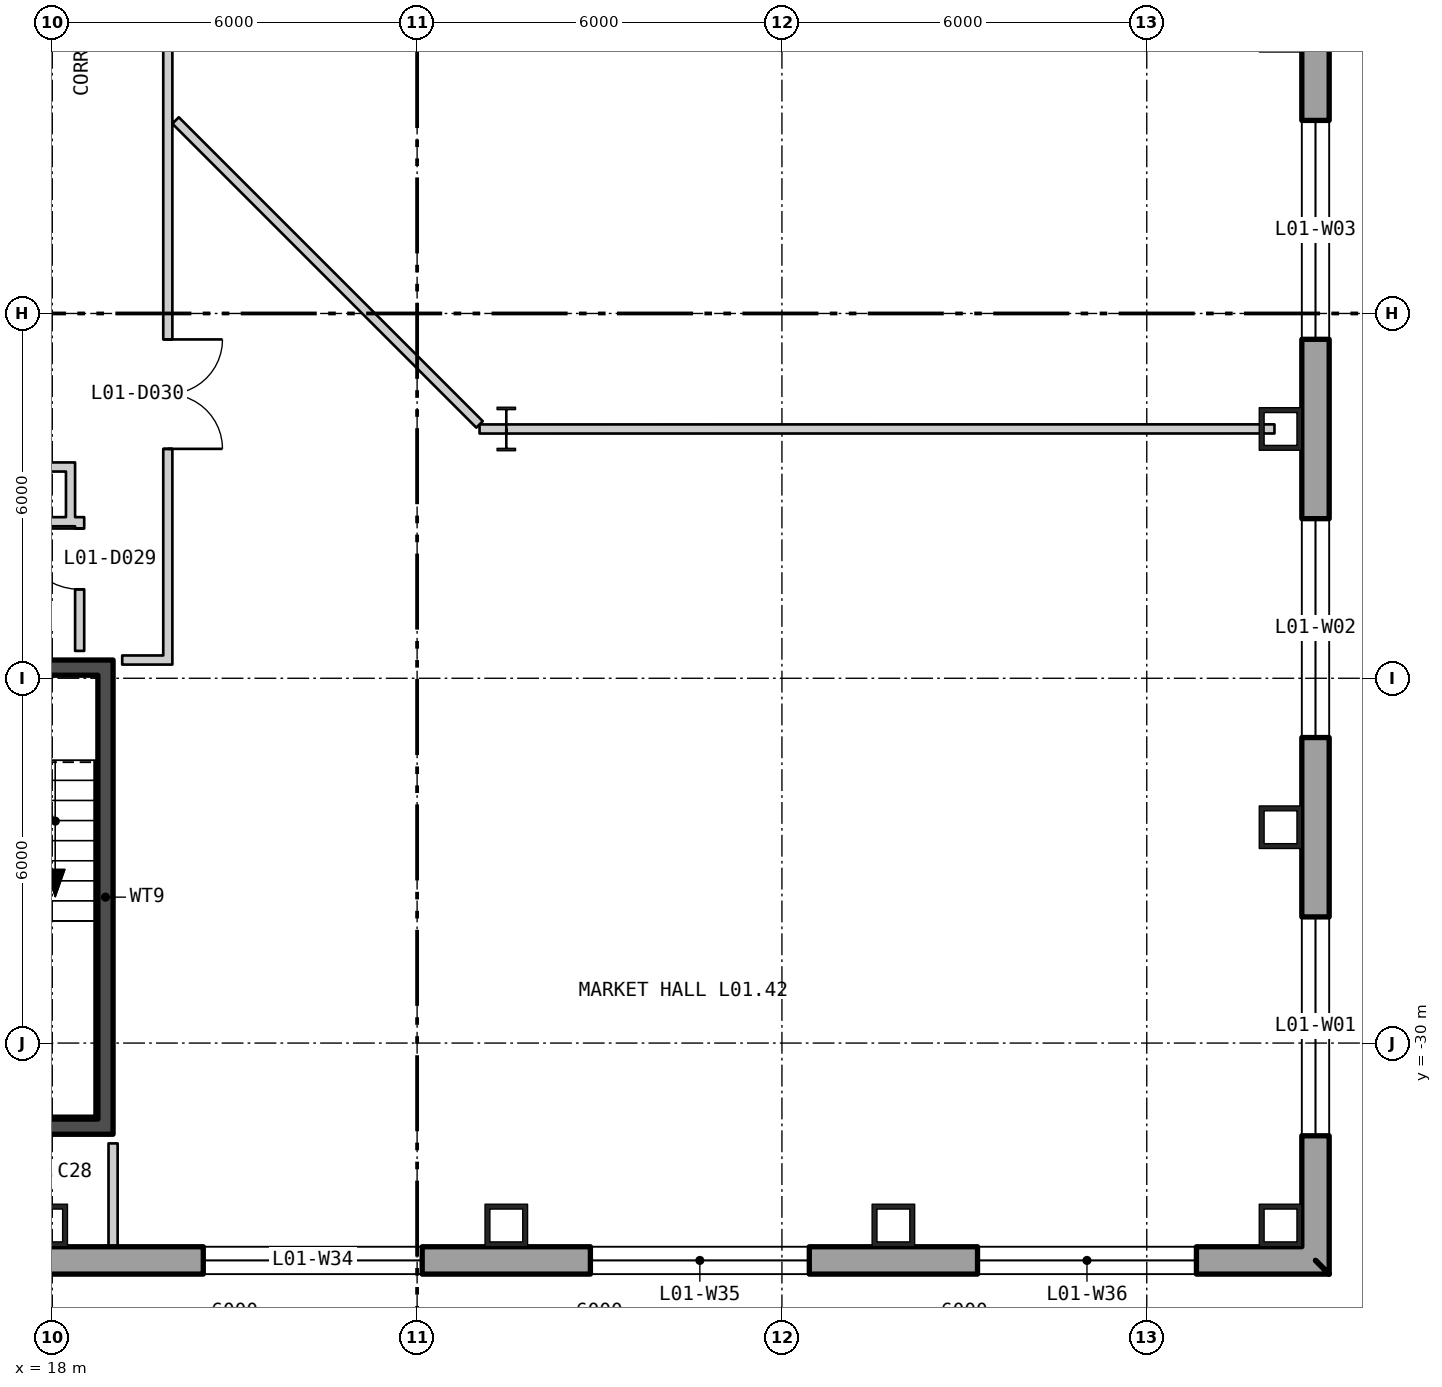
"""IFC4 building model, lengths in metres.
Left out: names, types, materials, properties, quantities, classifications, styles, units other than length and angle.
Written with IfcOpenShell. Run it as: python <this file> out.ifc"""

import sys

from ifc_helpers import new_model, si_unit, direction, frame, frame_2d, origin, origin_2d, place, context, subcontext, project, spatial, polyline, rectangle, hollow_rectangle, i_section, outline, extrude, element, fill, save


model = new_model("IFC4")
c1 = context("Model", 3, precision=1e-05, world=origin(), true_north=direction((0.0, 1.0)))
c2 = subcontext(c1, "Body", "Model", "MODEL_VIEW")
j1 = project(units=[si_unit("LENGTHUNIT", "METRE"), si_unit("PLANEANGLEUNIT", "RADIAN")], contexts=[c1])
p1 = place(None, origin())
s1 = spatial("IfcSite", under=j1, at=p1, CompositionType="ELEMENT")
p2 = place(p1, origin())
s2 = spatial("IfcBuilding", under=s1, at=p2, CompositionType="ELEMENT")
p3 = place(p2, frame((0.0, 0.0, 8.4)))
s3 = spatial("IfcBuildingStorey", under=s2, at=p3, CompositionType="ELEMENT", Elevation=8.4)
for number, where, z_axis, x_axis in (
    (1, (38.2, -33.0, 0.0), (0.0, 0.0, 1.0), (0.0, 1.0, 0.0)),
    (2, (38.2, -26.45, 0.0), (0.0, 0.0, 1.0), (0.0, 1.0, 0.0)),
    (3, (38.2, -19.9, 0.0), (0.0, 0.0, 1.0), (0.0, 1.0, 0.0)),
    (4, (17.9, -33.0, 0.0), (0.0, 0.0, 1.0), (1.0, 0.0, 0.0)),
    (5, (25.467, -33.0, 0.0), (0.0, 0.0, 1.0), (1.0, 0.0, 0.0)),
    (6, (31.833, -33.0, 0.0), (0.0, 0.0, 1.0), (1.0, 0.0, 0.0)),
):
    element("IfcColumn", number, at=place(p3, frame(where, z_axis=z_axis, x_axis=x_axis)), inside=s3, PredefinedType="COLUMN", context=c2, shape_type="SweptSolid", body=[
        extrude(hollow_rectangle(XDim=0.7, YDim=0.7, WallThickness=0.08, at=origin_2d()), origin(), (0.0, 0.0, 1.0), 5.1),
    ])
p4 = place(p3, frame((25.467, -19.9, 0.0), z_axis=(0.0, 0.0, 1.0), x_axis=(1.0, 0.0, 0.0)))
e7 = element("IfcColumn", 7, at=p4, inside=s3, PredefinedType="COLUMN", context=c2, shape_type="SweptSolid", body=[
    extrude(i_section(OverallWidth=0.304, OverallDepth=0.716, WebThickness=0.021, FlangeThickness=0.04, at=origin_2d()), origin(), (0.0, 0.0, 1.0), 5.1),
])
p5 = place(p3, frame((38.775, -33.575, -0.4), z_axis=(0.0, 0.0, 1.0), x_axis=(0.0, 1.0, 0.0)))
e8 = element("IfcWall", 8, at=p5, inside=s3, PredefinedType="SOLIDWALL", context=c2, shape_type="SweptSolid", body=[
    extrude(outline(polyline([(-0.225, -0.225), (53.775, -0.225), (53.325, 0.225), (0.225, 0.225), (-0.225, -0.225)])), origin(), (0.0, 0.0, 1.0), 5.1),
])
p6 = place(p5, frame((2.05, 0.0, 1.3)))
e9 = element("IfcOpeningElement", 9, at=p6, cuts=e8, PredefinedType="OPENING", context=c2, shape_type="SweptSolid", body=[
    extrude(rectangle(XDim=3.6, YDim=3.2, at=frame_2d((1.8, 1.6))), frame((0.0, 0.235, 0.0), z_axis=(0.0, -1.0, 0.0), x_axis=(1.0, 0.0, 0.0)), (0.0, 0.0, 1.0), 0.47),
])
p7 = place(p5, frame((8.6, 0.0, 1.3)))
e10 = element("IfcOpeningElement", 10, at=p7, cuts=e8, PredefinedType="OPENING", context=c2, shape_type="SweptSolid", body=[
    extrude(rectangle(XDim=3.6, YDim=3.2, at=frame_2d((1.8, 1.6))), frame((0.0, 0.235, 0.0), z_axis=(0.0, -1.0, 0.0), x_axis=(1.0, 0.0, 0.0)), (0.0, 0.0, 1.0), 0.47),
])
p8 = place(p5, frame((15.15, 0.0, 1.3)))
e11 = element("IfcOpeningElement", 11, at=p8, cuts=e8, PredefinedType="OPENING", context=c2, shape_type="SweptSolid", body=[
    extrude(rectangle(XDim=3.6, YDim=3.2, at=frame_2d((1.8, 1.6))), frame((0.0, 0.235, 0.0), z_axis=(0.0, -1.0, 0.0), x_axis=(1.0, 0.0, 0.0)), (0.0, 0.0, 1.0), 0.47),
])
p9 = place(p5, frame((21.7, 0.0, 1.3)))
e12 = element("IfcOpeningElement", 12, at=p9, cuts=e8, PredefinedType="OPENING", context=c2, shape_type="SweptSolid", body=[
    extrude(rectangle(XDim=3.6, YDim=3.2, at=frame_2d((1.8, 1.6))), frame((0.0, 0.235, 0.0), z_axis=(0.0, -1.0, 0.0), x_axis=(1.0, 0.0, 0.0)), (0.0, 0.0, 1.0), 0.47),
])
p10 = place(p5, frame((28.25, 0.0, 1.3)))
e13 = element("IfcOpeningElement", 13, at=p10, cuts=e8, PredefinedType="OPENING", context=c2, shape_type="SweptSolid", body=[
    extrude(rectangle(XDim=3.6, YDim=3.2, at=frame_2d((1.8, 1.6))), frame((0.0, 0.235, 0.0), z_axis=(0.0, -1.0, 0.0), x_axis=(1.0, 0.0, 0.0)), (0.0, 0.0, 1.0), 0.47),
])
p11 = place(p5, frame((34.8, 0.0, 1.3)))
e14 = element("IfcOpeningElement", 14, at=p11, cuts=e8, PredefinedType="OPENING", context=c2, shape_type="SweptSolid", body=[
    extrude(rectangle(XDim=3.6, YDim=3.2, at=frame_2d((1.8, 1.6))), frame((0.0, 0.235, 0.0), z_axis=(0.0, -1.0, 0.0), x_axis=(1.0, 0.0, 0.0)), (0.0, 0.0, 1.0), 0.47),
])
p12 = place(p5, frame((41.35, 0.0, 1.3)))
e15 = element("IfcOpeningElement", 15, at=p12, cuts=e8, PredefinedType="OPENING", context=c2, shape_type="SweptSolid", body=[
    extrude(rectangle(XDim=3.6, YDim=3.2, at=frame_2d((1.8, 1.6))), frame((0.0, 0.235, 0.0), z_axis=(0.0, -1.0, 0.0), x_axis=(1.0, 0.0, 0.0)), (0.0, 0.0, 1.0), 0.47),
])
p13 = place(p5, frame((47.9, 0.0, 1.3)))
e16 = element("IfcOpeningElement", 16, at=p13, cuts=e8, PredefinedType="OPENING", context=c2, shape_type="SweptSolid", body=[
    extrude(rectangle(XDim=3.6, YDim=3.2, at=frame_2d((1.8, 1.6))), frame((0.0, 0.235, 0.0), z_axis=(0.0, -1.0, 0.0), x_axis=(1.0, 0.0, 0.0)), (0.0, 0.0, 1.0), 0.47),
])
p14 = place(p3, frame((-38.775, -33.575, -0.4), z_axis=(0.0, 0.0, 1.0), x_axis=(1.0, 0.0, 0.0)))
e17 = element("IfcWall", 17, at=p14, inside=s3, PredefinedType="SOLIDWALL", context=c2, shape_type="SweptSolid", body=[
    extrude(outline(polyline([(-0.225, -0.225), (77.775, -0.225), (77.325, 0.225), (0.225, 0.225), (-0.225, -0.225)])), origin(), (0.0, 0.0, 1.0), 5.1),
])
p15 = place(p14, frame((1.958, 0.0, 1.3)))
e18 = element("IfcOpeningElement", 18, at=p15, cuts=e17, PredefinedType="OPENING", context=c2, shape_type="SweptSolid", body=[
    extrude(rectangle(XDim=3.6, YDim=3.2, at=frame_2d((1.8, 1.6))), frame((0.0, 0.235, 0.0), z_axis=(0.0, -1.0, 0.0), x_axis=(1.0, 0.0, 0.0)), (0.0, 0.0, 1.0), 0.47),
])
p16 = place(p14, frame((8.325, 0.0, 1.3)))
e19 = element("IfcOpeningElement", 19, at=p16, cuts=e17, PredefinedType="OPENING", context=c2, shape_type="SweptSolid", body=[
    extrude(rectangle(XDim=3.6, YDim=3.2, at=frame_2d((1.8, 1.6))), frame((0.0, 0.235, 0.0), z_axis=(0.0, -1.0, 0.0), x_axis=(1.0, 0.0, 0.0)), (0.0, 0.0, 1.0), 0.47),
])
p17 = place(p14, frame((14.692, 0.0, 1.3)))
e20 = element("IfcOpeningElement", 20, at=p17, cuts=e17, PredefinedType="OPENING", context=c2, shape_type="SweptSolid", body=[
    extrude(rectangle(XDim=3.6, YDim=3.2, at=frame_2d((1.8, 1.6))), frame((0.0, 0.235, 0.0), z_axis=(0.0, -1.0, 0.0), x_axis=(1.0, 0.0, 0.0)), (0.0, 0.0, 1.0), 0.47),
])
p18 = place(p14, frame((21.325, 0.0, 1.3)))
e21 = element("IfcOpeningElement", 21, at=p18, cuts=e17, PredefinedType="OPENING", context=c2, shape_type="SweptSolid", body=[
    extrude(rectangle(XDim=3.6, YDim=3.2, at=frame_2d((1.8, 1.6))), frame((0.0, 0.235, 0.0), z_axis=(0.0, -1.0, 0.0), x_axis=(1.0, 0.0, 0.0)), (0.0, 0.0, 1.0), 0.47),
])
p19 = place(p14, frame((27.425, 0.0, 1.3)))
e22 = element("IfcOpeningElement", 22, at=p19, cuts=e17, PredefinedType="OPENING", context=c2, shape_type="SweptSolid", body=[
    extrude(rectangle(XDim=3.6, YDim=3.2, at=frame_2d((1.8, 1.6))), frame((0.0, 0.235, 0.0), z_axis=(0.0, -1.0, 0.0), x_axis=(1.0, 0.0, 0.0)), (0.0, 0.0, 1.0), 0.47),
])
p20 = place(p14, frame((33.792, 0.0, 1.3)))
e23 = element("IfcOpeningElement", 23, at=p20, cuts=e17, PredefinedType="OPENING", context=c2, shape_type="SweptSolid", body=[
    extrude(rectangle(XDim=3.6, YDim=3.2, at=frame_2d((1.8, 1.6))), frame((0.0, 0.235, 0.0), z_axis=(0.0, -1.0, 0.0), x_axis=(1.0, 0.0, 0.0)), (0.0, 0.0, 1.0), 0.47),
])
p21 = place(p14, frame((40.158, 0.0, 1.3)))
e24 = element("IfcOpeningElement", 24, at=p21, cuts=e17, PredefinedType="OPENING", context=c2, shape_type="SweptSolid", body=[
    extrude(rectangle(XDim=3.6, YDim=3.2, at=frame_2d((1.8, 1.6))), frame((0.0, 0.235, 0.0), z_axis=(0.0, -1.0, 0.0), x_axis=(1.0, 0.0, 0.0)), (0.0, 0.0, 1.0), 0.47),
])
p22 = place(p14, frame((46.525, 0.0, 1.3)))
e25 = element("IfcOpeningElement", 25, at=p22, cuts=e17, PredefinedType="OPENING", context=c2, shape_type="SweptSolid", body=[
    extrude(rectangle(XDim=3.6, YDim=3.2, at=frame_2d((1.8, 1.6))), frame((0.0, 0.235, 0.0), z_axis=(0.0, -1.0, 0.0), x_axis=(1.0, 0.0, 0.0)), (0.0, 0.0, 1.0), 0.47),
])
p23 = place(p14, frame((52.625, 0.0, 1.3)))
e26 = element("IfcOpeningElement", 26, at=p23, cuts=e17, PredefinedType="OPENING", context=c2, shape_type="SweptSolid", body=[
    extrude(rectangle(XDim=3.6, YDim=3.2, at=frame_2d((1.8, 1.6))), frame((0.0, 0.235, 0.0), z_axis=(0.0, -1.0, 0.0), x_axis=(1.0, 0.0, 0.0)), (0.0, 0.0, 1.0), 0.47),
])
p24 = place(p14, frame((59.258, 0.0, 1.3)))
e27 = element("IfcOpeningElement", 27, at=p24, cuts=e17, PredefinedType="OPENING", context=c2, shape_type="SweptSolid", body=[
    extrude(rectangle(XDim=3.6, YDim=3.2, at=frame_2d((1.8, 1.6))), frame((0.0, 0.235, 0.0), z_axis=(0.0, -1.0, 0.0), x_axis=(1.0, 0.0, 0.0)), (0.0, 0.0, 1.0), 0.47),
])
p25 = place(p14, frame((65.625, 0.0, 1.3)))
e28 = element("IfcOpeningElement", 28, at=p25, cuts=e17, PredefinedType="OPENING", context=c2, shape_type="SweptSolid", body=[
    extrude(rectangle(XDim=3.6, YDim=3.2, at=frame_2d((1.8, 1.6))), frame((0.0, 0.235, 0.0), z_axis=(0.0, -1.0, 0.0), x_axis=(1.0, 0.0, 0.0)), (0.0, 0.0, 1.0), 0.47),
])
p26 = place(p14, frame((71.992, 0.0, 1.3)))
e29 = element("IfcOpeningElement", 29, at=p26, cuts=e17, PredefinedType="OPENING", context=c2, shape_type="SweptSolid", body=[
    extrude(rectangle(XDim=3.6, YDim=3.2, at=frame_2d((1.8, 1.6))), frame((0.0, 0.235, 0.0), z_axis=(0.0, -1.0, 0.0), x_axis=(1.0, 0.0, 0.0)), (0.0, 0.0, 1.0), 0.47),
])
p27 = place(p3, frame((18.875, -31.25, 0.0), z_axis=(0.0, 0.0, 1.0), x_axis=(0.0, 1.0, 0.0)))
e30 = element("IfcWall", 30, at=p27, inside=s3, PredefinedType="SHEAR", context=c2, shape_type="SweptSolid", body=[
    extrude(rectangle(XDim=7.3, YDim=0.25, at=frame_2d((3.65, 0.0))), origin(), (0.0, 0.0, 1.0), 4.88),
])
p28 = place(p3, frame((15.5, -31.375, 0.0), z_axis=(0.0, 0.0, 1.0), x_axis=(1.0, 0.0, 0.0)))
e31 = element("IfcWall", 31, at=p28, inside=s3, PredefinedType="SHEAR", context=c2, shape_type="SweptSolid", body=[
    extrude(rectangle(XDim=3.5, YDim=0.25, at=frame_2d((1.75, 0.0))), origin(), (0.0, 0.0, 1.0), 4.88),
])
p29 = place(p3, frame((15.5, -23.825, 0.0), z_axis=(0.0, 0.0, 1.0), x_axis=(1.0, 0.0, 0.0)))
e32 = element("IfcWall", 32, at=p29, inside=s3, PredefinedType="SHEAR", context=c2, shape_type="SweptSolid", body=[
    extrude(rectangle(XDim=3.5, YDim=0.25, at=frame_2d((1.75, 0.0))), origin(), (0.0, 0.0, 1.0), 4.88),
])
p30 = place(p29, frame((1.15, 0.0, 0.0)))
e33 = element("IfcOpeningElement", 33, at=p30, cuts=e32, PredefinedType="OPENING", context=c2, shape_type="SweptSolid", body=[
    extrude(rectangle(XDim=1.2, YDim=2.1, at=frame_2d((0.6, 1.05))), frame((0.0, 0.135, 0.0), z_axis=(0.0, -1.0, 0.0), x_axis=(1.0, 0.0, 0.0)), (0.0, 0.0, 1.0), 0.27),
])
for number, where, z_axis, x_axis in (
    (34, (17.575, -21.425, 0.0), (0.0, 0.0, 1.0), (1.0, 0.0, 0.0)),
    (35, (17.575, -20.525, 0.0), (0.0, 0.0, 1.0), (1.0, 0.0, 0.0)),
):
    element("IfcWall", number, at=place(p3, frame(where, z_axis=z_axis, x_axis=x_axis)), inside=s3, PredefinedType="PARTITIONING", context=c2, shape_type="SweptSolid", body=[
        extrude(rectangle(XDim=0.65, YDim=0.15, at=frame_2d((0.325, 0.0))), origin(), (0.0, 0.0, 1.0), 4.88),
    ])
p31 = place(p3, frame((18.3, -21.5, 0.0), z_axis=(0.0, 0.0, 1.0), x_axis=(0.0, 1.0, 0.0)))
e36 = element("IfcWall", 36, at=p31, inside=s3, PredefinedType="PARTITIONING", context=c2, shape_type="SweptSolid", body=[
    extrude(rectangle(XDim=1.05, YDim=0.15, at=frame_2d((0.525, 0.0))), origin(), (0.0, 0.0, 1.0), 4.88),
])
p32 = place(p3, frame((18.45, -23.55, 0.0), z_axis=(0.0, 0.0, 1.0), x_axis=(0.0, 1.0, 0.0)))
e37 = element("IfcWall", 37, at=p32, inside=s3, PredefinedType="PARTITIONING", context=c2, shape_type="SweptSolid", body=[
    extrude(rectangle(XDim=2.2, YDim=0.15, at=frame_2d((1.1, 0.0))), origin(), (0.0, 0.0, 1.0), 4.88),
])
p33 = place(p32, frame((1.013, 0.0, 0.0)))
e38 = element("IfcOpeningElement", 38, at=p33, cuts=e37, PredefinedType="OPENING", context=c2, shape_type="SweptSolid", body=[
    extrude(rectangle(XDim=1.0, YDim=2.1, at=frame_2d((0.5, 1.05))), frame((0.0, 0.085, 0.0), z_axis=(0.0, -1.0, 0.0), x_axis=(1.0, 0.0, 0.0)), (0.0, 0.0, 1.0), 0.17),
])
p34 = place(p3, frame((19.0, -33.348, 0.0), z_axis=(0.0, 0.0, 1.0), x_axis=(0.0, 1.0, 0.0)))
e39 = element("IfcWall", 39, at=p34, inside=s3, PredefinedType="PARTITIONING", context=c2, shape_type="SweptSolid", body=[
    extrude(rectangle(XDim=0.448, YDim=0.15, at=frame_2d((0.224, 0.0))), origin(), (0.0, 0.0, 1.0), 4.88),
])
p35 = place(p3, frame((19.0, -32.9, 0.0), z_axis=(0.0, 0.0, 1.0), x_axis=(0.0, 1.0, 0.0)))
e40 = element("IfcWall", 40, at=p35, inside=s3, PredefinedType="PARTITIONING", context=c2, shape_type="SweptSolid", body=[
    extrude(rectangle(XDim=1.25, YDim=0.15, at=frame_2d((0.625, 0.0))), origin(), (0.0, 0.0, 1.0), 4.19),
])
p36 = place(p3, frame((19.15, -23.7, 0.0), z_axis=(0.0, 0.0, 1.0), x_axis=(1.0, 0.0, 0.0)))
e41 = element("IfcWall", 41, at=p36, inside=s3, PredefinedType="PARTITIONING", context=c2, shape_type="SweptSolid", body=[
    extrude(rectangle(XDim=0.675, YDim=0.15, at=frame_2d((0.338, 0.0))), origin(), (0.0, 0.0, 1.0), 4.88),
])
p37 = place(p3, frame((19.9, -23.775, 0.0), z_axis=(0.0, 0.0, 1.0), x_axis=(0.0, 1.0, 0.0)))
e42 = element("IfcWall", 42, at=p37, inside=s3, PredefinedType="PARTITIONING", context=c2, shape_type="SweptSolid", body=[
    extrude(rectangle(XDim=16.972, YDim=0.15, at=frame_2d((8.486, 0.0))), origin(), (0.0, 0.0, 1.0), 4.88),
])
p38 = place(p37, frame((3.548, 0.0, 0.0)))
e43 = element("IfcOpeningElement", 43, at=p38, cuts=e42, PredefinedType="OPENING", context=c2, shape_type="SweptSolid", body=[
    extrude(rectangle(XDim=1.8, YDim=2.1, at=frame_2d((0.9, 1.05))), frame((0.0, 0.085, 0.0), z_axis=(0.0, -1.0, 0.0), x_axis=(1.0, 0.0, 0.0)), (0.0, 0.0, 1.0), 0.17),
])
p39 = place(p3, frame((20.028, -14.826, 0.0), z_axis=(0.0, 0.0, 1.0), x_axis=(0.707106781187, -0.707106781187, 0.0)))
e44 = element("IfcWall", 44, at=p39, inside=s3, PredefinedType="PARTITIONING", context=c2, shape_type="SweptSolid", body=[
    extrude(rectangle(XDim=7.07, YDim=0.15, at=frame_2d((3.535, 0.0))), origin(), (0.0, 0.0, 1.0), 4.88),
])
p40 = place(p3, frame((25.027, -19.9, 0.0), z_axis=(0.0, 0.0, 1.0), x_axis=(1.0, 0.0, 0.0)))
e45 = element("IfcWall", 45, at=p40, inside=s3, PredefinedType="PARTITIONING", context=c2, shape_type="SweptSolid", body=[
    extrude(rectangle(XDim=0.44, YDim=0.15, at=frame_2d((0.22, 0.0))), origin(), (0.0, 0.0, 1.0), 4.88),
])
p41 = place(p3, frame((25.467, -19.9, 0.0), z_axis=(0.0, 0.0, 1.0), x_axis=(0.999999996867, 7.9157761e-05, 0.0)))
e46 = element("IfcWall", 46, at=p41, inside=s3, PredefinedType="PARTITIONING", context=c2, shape_type="SweptSolid", body=[
    extrude(rectangle(XDim=12.633, YDim=0.15, at=frame_2d((6.316, 0.0))), origin(), (0.0, 0.0, 1.0), 4.09),
])
p42 = place(p6, origin())
e47 = element("IfcWindow", 47, at=p42, inside=s3, PartitioningType="SINGLE_PANEL", PredefinedType="WINDOW", context=c2, shape_type="SweptSolid", body=[
    extrude(rectangle(XDim=3.6, YDim=3.2, at=frame_2d((1.8, 1.6))), frame((0.0, 0.105, 0.0), z_axis=(0.0, -1.0, 0.0), x_axis=(1.0, 0.0, 0.0)), (0.0, 0.0, 1.0), 0.06),
])
fill(e9, e47)
p43 = place(p7, origin())
e48 = element("IfcWindow", 48, at=p43, inside=s3, PartitioningType="SINGLE_PANEL", PredefinedType="WINDOW", context=c2, shape_type="SweptSolid", body=[
    extrude(rectangle(XDim=3.6, YDim=3.2, at=frame_2d((1.8, 1.6))), frame((0.0, 0.105, 0.0), z_axis=(0.0, -1.0, 0.0), x_axis=(1.0, 0.0, 0.0)), (0.0, 0.0, 1.0), 0.06),
])
fill(e10, e48)
p44 = place(p8, origin())
e49 = element("IfcWindow", 49, at=p44, inside=s3, PartitioningType="SINGLE_PANEL", PredefinedType="WINDOW", context=c2, shape_type="SweptSolid", body=[
    extrude(rectangle(XDim=3.6, YDim=3.2, at=frame_2d((1.8, 1.6))), frame((0.0, 0.105, 0.0), z_axis=(0.0, -1.0, 0.0), x_axis=(1.0, 0.0, 0.0)), (0.0, 0.0, 1.0), 0.06),
])
fill(e11, e49)
p45 = place(p24, origin())
e50 = element("IfcWindow", 50, at=p45, inside=s3, PartitioningType="SINGLE_PANEL", PredefinedType="WINDOW", context=c2, shape_type="SweptSolid", body=[
    extrude(rectangle(XDim=3.6, YDim=3.2, at=frame_2d((1.8, 1.6))), frame((0.0, 0.105, 0.0), z_axis=(0.0, -1.0, 0.0), x_axis=(1.0, 0.0, 0.0)), (0.0, 0.0, 1.0), 0.06),
])
fill(e27, e50)
p46 = place(p25, origin())
e51 = element("IfcWindow", 51, at=p46, inside=s3, PartitioningType="SINGLE_PANEL", PredefinedType="WINDOW", context=c2, shape_type="SweptSolid", body=[
    extrude(rectangle(XDim=3.6, YDim=3.2, at=frame_2d((1.8, 1.6))), frame((0.0, 0.105, 0.0), z_axis=(0.0, -1.0, 0.0), x_axis=(1.0, 0.0, 0.0)), (0.0, 0.0, 1.0), 0.06),
])
fill(e28, e51)
p47 = place(p26, origin())
e52 = element("IfcWindow", 52, at=p47, inside=s3, PartitioningType="SINGLE_PANEL", PredefinedType="WINDOW", context=c2, shape_type="SweptSolid", body=[
    extrude(rectangle(XDim=3.6, YDim=3.2, at=frame_2d((1.8, 1.6))), frame((0.0, 0.105, 0.0), z_axis=(0.0, -1.0, 0.0), x_axis=(1.0, 0.0, 0.0)), (0.0, 0.0, 1.0), 0.06),
])
fill(e29, e52)
p48 = place(p33, origin())
e53 = element("IfcDoor", 53, at=p48, inside=s3, OperationType="SINGLE_SWING_LEFT", PredefinedType="DOOR", context=c2, shape_type="SweptSolid", body=[
    extrude(rectangle(XDim=1.0, YDim=2.1, at=frame_2d((0.5, 1.05))), frame((0.0, 0.025, 0.0), z_axis=(0.0, -1.0, 0.0), x_axis=(1.0, 0.0, 0.0)), (0.0, 0.0, 1.0), 0.05),
])
fill(e38, e53)
p49 = place(p38, origin())
e54 = element("IfcDoor", 54, at=p49, inside=s3, OperationType="DOUBLE_DOOR_SINGLE_SWING", PredefinedType="DOOR", context=c2, shape_type="SweptSolid", body=[
    extrude(rectangle(XDim=1.8, YDim=2.1, at=frame_2d((0.9, 1.05))), frame((0.0, 0.025, 0.0), z_axis=(0.0, -1.0, 0.0), x_axis=(1.0, 0.0, 0.0)), (0.0, 0.0, 1.0), 0.05),
])
fill(e43, e54)
save(model, sys.argv[1])
